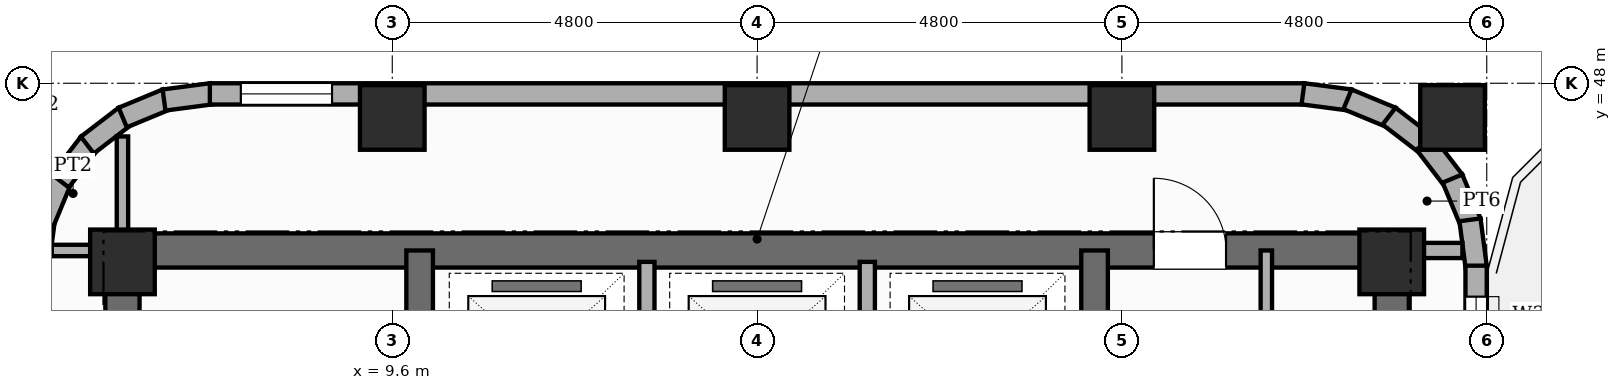
"""IFC4 building model, lengths in metres.
Left out: names, types, materials, properties, quantities, classifications, styles, units other than length and angle.
Written with IfcOpenShell. Run it as: python <this file> out.ifc"""

import sys

from ifc_helpers import new_model, si_unit, direction, frame, frame_2d, origin, origin_2d, place, context, subcontext, project, spatial, rectangle, extrude, element, fill, save


model = new_model("IFC4")
c1 = context("Model", 3, precision=1e-05, world=origin(), true_north=direction((0.0, 1.0)))
c2 = subcontext(c1, "Body", "Model", "MODEL_VIEW")
j1 = project(units=[si_unit("LENGTHUNIT", "METRE"), si_unit("PLANEANGLEUNIT", "RADIAN")], contexts=[c1])
p1 = place(None, origin())
s1 = spatial("IfcSite", under=j1, at=p1, CompositionType="ELEMENT")
p2 = place(p1, origin())
s2 = spatial("IfcBuilding", under=s1, at=p2, CompositionType="ELEMENT")
p3 = place(p2, frame((0.0, 0.0, 239.8)))
s3 = spatial("IfcBuildingStorey", under=s2, at=p3, CompositionType="ELEMENT", Elevation=239.8)
p4 = place(p3, frame((6.05, 30.675, 0.0), z_axis=(0.0, 0.0, 1.0), x_axis=(0.0, 1.0, 0.0)))
e1 = element("IfcWall", 1, at=p4, inside=s3, PredefinedType="SHEAR", context=c2, shape_type="SweptSolid", body=[
    extrude(rectangle(XDim=15.35, YDim=0.45, at=frame_2d((7.675, 0.0))), origin(), (0.0, 0.0, 1.0), 4.3),
])
p5 = place(p4, frame((10.675, 0.0, 0.0)))
e2 = element("IfcOpeningElement", 2, at=p5, cuts=e1, PredefinedType="OPENING", context=c2, shape_type="SweptSolid", body=[
    extrude(rectangle(XDim=0.95, YDim=2.15, at=frame_2d((0.475, 1.075))), frame((0.0, 0.235, 0.0), z_axis=(0.0, -1.0, 0.0), x_axis=(1.0, 0.0, 0.0)), (0.0, 0.0, 1.0), 0.47),
])
p6 = place(p3, frame((22.75, 30.675, 0.0), z_axis=(0.0, 0.0, 1.0), x_axis=(0.0, 1.0, 0.0)))
e3 = element("IfcWall", 3, at=p6, inside=s3, PredefinedType="SHEAR", context=c2, shape_type="SweptSolid", body=[
    extrude(rectangle(XDim=15.35, YDim=0.45, at=frame_2d((7.675, 0.0))), origin(), (0.0, 0.0, 1.0), 4.3),
])
p7 = place(p3, frame((6.05, 45.8, 0.0), z_axis=(0.0, 0.0, 1.0), x_axis=(1.0, 0.0, 0.0)))
e4 = element("IfcWall", 4, at=p7, inside=s3, PredefinedType="SHEAR", context=c2, shape_type="SweptSolid", body=[
    extrude(rectangle(XDim=16.7, YDim=0.45, at=frame_2d((8.35, 0.0))), origin(), (0.0, 0.0, 1.0), 4.3),
])
p8 = place(p7, frame((13.57, 0.0, 0.0)))
e5 = element("IfcOpeningElement", 5, at=p8, cuts=e4, PredefinedType="OPENING", context=c2, shape_type="SweptSolid", body=[
    extrude(rectangle(XDim=0.95, YDim=2.15, at=frame_2d((0.475, 1.075))), frame((0.0, 0.235, 0.0), z_axis=(0.0, -1.0, 0.0), x_axis=(1.0, 0.0, 0.0)), (0.0, 0.0, 1.0), 0.47),
])
p9 = place(p3, frame((9.96, 30.9, 0.0), z_axis=(0.0, 0.0, 1.0), x_axis=(0.0, 1.0, 0.0)))
e6 = element("IfcWall", 6, at=p9, inside=s3, PredefinedType="SHEAR", context=c2, shape_type="SweptSolid", body=[
    extrude(rectangle(XDim=14.9, YDim=0.35, at=frame_2d((7.45, 0.0))), origin(), (0.0, 0.0, 1.0), 4.3),
])
p10 = place(p9, frame((0.65, 0.0, 0.0)))
e7 = element("IfcOpeningElement", 7, at=p10, cuts=e6, PredefinedType="OPENING", context=c2, shape_type="SweptSolid", body=[
    extrude(rectangle(XDim=0.95, YDim=2.1, at=frame_2d((0.475, 1.05))), frame((0.0, 0.185, 0.0), z_axis=(0.0, -1.0, 0.0), x_axis=(1.0, 0.0, 0.0)), (0.0, 0.0, 1.0), 0.37),
])
p11 = place(p9, frame((10.45, 0.0, 0.0)))
e8 = element("IfcOpeningElement", 8, at=p11, cuts=e6, PredefinedType="OPENING", context=c2, shape_type="SweptSolid", body=[
    extrude(rectangle(XDim=1.0, YDim=2.15, at=frame_2d((0.5, 1.075))), frame((0.0, 0.185, 0.0), z_axis=(0.0, -1.0, 0.0), x_axis=(1.0, 0.0, 0.0)), (0.0, 0.0, 1.0), 0.37),
])
p12 = place(p3, frame((18.84, 30.9, 0.0), z_axis=(0.0, 0.0, 1.0), x_axis=(0.0, 1.0, 0.0)))
e9 = element("IfcWall", 9, at=p12, inside=s3, PredefinedType="SHEAR", context=c2, shape_type="SweptSolid", body=[
    extrude(rectangle(XDim=14.9, YDim=0.35, at=frame_2d((7.45, 0.0))), origin(), (0.0, 0.0, 1.0), 4.3),
])
p13 = place(p12, frame((0.65, 0.0, 0.0)))
e10 = element("IfcOpeningElement", 10, at=p13, cuts=e9, PredefinedType="OPENING", context=c2, shape_type="SweptSolid", body=[
    extrude(rectangle(XDim=0.95, YDim=2.1, at=frame_2d((0.475, 1.05))), frame((0.0, 0.185, 0.0), z_axis=(0.0, -1.0, 0.0), x_axis=(1.0, 0.0, 0.0)), (0.0, 0.0, 1.0), 0.37),
])
p14 = place(p12, frame((10.45, 0.0, 0.0)))
e11 = element("IfcOpeningElement", 11, at=p14, cuts=e9, PredefinedType="OPENING", context=c2, shape_type="SweptSolid", body=[
    extrude(rectangle(XDim=1.0, YDim=2.15, at=frame_2d((0.5, 1.075))), frame((0.0, 0.185, 0.0), z_axis=(0.0, -1.0, 0.0), x_axis=(1.0, 0.0, 0.0)), (0.0, 0.0, 1.0), 0.37),
])
for number, where, z_axis, x_axis in (
    (12, (6.05, 45.65, 0.0), (0.0, 0.0, 1.0), (1.0, 0.0, 0.0)),
    (13, (9.6, 47.55, 0.0), (0.0, 0.0, 1.0), (1.0, 0.0, 0.0)),
    (14, (14.4, 47.55, 0.0), (0.0, 0.0, 1.0), (1.0, 0.0, 0.0)),
    (15, (19.2, 47.55, 0.0), (0.0, 0.0, 1.0), (1.0, 0.0, 0.0)),
    (16, (22.75, 45.65, 0.0), (0.0, 0.0, 1.0), (1.0, 0.0, 0.0)),
    (17, (23.55, 47.55, 0.0), (0.0, 0.0, 1.0), (1.0, 0.0, 0.0)),
):
    element("IfcColumn", number, at=place(p3, frame(where, z_axis=z_axis, x_axis=x_axis)), inside=s3, PredefinedType="COLUMN", context=c2, shape_type="SweptSolid", body=[
        extrude(rectangle(XDim=0.85, YDim=0.85, at=origin_2d()), origin(), (0.0, 0.0, 1.0), 4.3),
    ])
for number, where, z_axis, x_axis in (
    (18, (4.939, 45.582, 0.0), (0.0, 0.0, 1.0), (0.131, 0.991, 0.0)),
    (19, (5.011, 46.167, 0.0), (0.0, 0.0, 1.0), (0.383, 0.924, 0.0)),
    (20, (5.233, 46.715, 0.0), (0.0, 0.0, 1.0), (0.609, 0.793, 0.0)),
    (21, (5.588, 47.186, 0.0), (0.0, 0.0, 1.0), (0.793, 0.609, 0.0)),
):
    element("IfcWall", number, at=place(p3, frame(where, z_axis=z_axis, x_axis=x_axis)), inside=s3, PredefinedType="STANDARD", context=c2, shape_type="SweptSolid", body=[
        extrude(rectangle(XDim=0.626, YDim=0.28, at=frame_2d((0.313, 0.0))), origin(), (0.0, 0.0, 1.0), 4.04),
    ])
p15 = place(p3, frame((6.054, 47.549, 0.0), z_axis=(0.0, 0.0, 1.0), x_axis=(0.923974080304, 0.382455093999, 0.0)))
e22 = element("IfcWall", 22, at=p15, inside=s3, PredefinedType="STANDARD", context=c2, shape_type="SweptSolid", body=[
    extrude(rectangle(XDim=0.626, YDim=0.28, at=frame_2d((0.313, 0.0))), origin(), (0.0, 0.0, 1.0), 4.04),
])
p16 = place(p3, frame((6.597, 47.779, 0.0), z_axis=(0.0, 0.0, 1.0), x_axis=(0.9914410257, 0.130555323746, 0.0)))
e23 = element("IfcWall", 23, at=p16, inside=s3, PredefinedType="STANDARD", context=c2, shape_type="SweptSolid", body=[
    extrude(rectangle(XDim=0.626, YDim=0.28, at=frame_2d((0.313, 0.0))), origin(), (0.0, 0.0, 1.0), 4.04),
])
p17 = place(p3, frame((7.2, 47.86, 0.0), z_axis=(0.0, 0.0, 1.0), x_axis=(1.0, 0.0, 0.0)))
e24 = element("IfcWall", 24, at=p17, inside=s3, PredefinedType="STANDARD", context=c2, shape_type="SweptSolid", body=[
    extrude(rectangle(XDim=14.4, YDim=0.28, at=frame_2d((7.2, 0.0))), origin(), (0.0, 0.0, 1.0), 3.32),
])
p18 = place(p17, frame((0.407, 0.0, 0.8)))
e25 = element("IfcOpeningElement", 25, at=p18, cuts=e24, PredefinedType="OPENING", context=c2, shape_type="SweptSolid", body=[
    extrude(rectangle(XDim=1.2, YDim=1.8, at=frame_2d((0.6, 0.9))), frame((0.0, 0.15, 0.0), z_axis=(0.0, -1.0, 0.0), x_axis=(1.0, 0.0, 0.0)), (0.0, 0.0, 1.0), 0.3),
])
for number, where, z_axis, x_axis in (
    (26, (21.582, 47.861, 0.0), (0.0, 0.0, 1.0), (0.991, -0.131, 0.0)),
    (27, (22.167, 47.789, 0.0), (0.0, 0.0, 1.0), (0.924, -0.382, 0.0)),
    (28, (22.715, 47.567, 0.0), (0.0, 0.0, 1.0), (0.793, -0.609, 0.0)),
    (29, (23.186, 47.212, 0.0), (0.0, 0.0, 1.0), (0.609, -0.793, 0.0)),
    (30, (23.549, 46.746, 0.0), (0.0, 0.0, 1.0), (0.382, -0.924, 0.0)),
    (31, (23.779, 46.203, 0.0), (0.0, 0.0, 1.0), (0.131, -0.991, 0.0)),
):
    element("IfcWall", number, at=place(p3, frame(where, z_axis=z_axis, x_axis=x_axis)), inside=s3, PredefinedType="STANDARD", context=c2, shape_type="SweptSolid", body=[
        extrude(rectangle(XDim=0.626, YDim=0.28, at=frame_2d((0.313, 0.0))), origin(), (0.0, 0.0, 1.0), 3.32),
    ])
p19 = place(p3, frame((23.86, 45.6, 0.0), z_axis=(0.0, 0.0, 1.0), x_axis=(0.0, -1.0, 0.0)))
e32 = element("IfcWall", 32, at=p19, inside=s3, PredefinedType="STANDARD", context=c2, shape_type="SweptSolid", body=[
    extrude(rectangle(XDim=33.6, YDim=0.28, at=frame_2d((16.8, 0.0))), origin(), (0.0, 0.0, 1.0), 3.32),
])
p20 = place(p19, frame((3.5, 0.0, 0.0)))
e33 = element("IfcOpeningElement", 33, at=p20, cuts=e32, PredefinedType="OPENING", context=c2, shape_type="SweptSolid", body=[
    extrude(rectangle(XDim=1.3, YDim=2.2, at=frame_2d((0.65, 1.1))), frame((0.0, 0.15, 0.0), z_axis=(0.0, -1.0, 0.0), x_axis=(1.0, 0.0, 0.0)), (0.0, 0.0, 1.0), 0.3),
])
p21 = place(p19, frame((23.45, 0.0, 0.0)))
e34 = element("IfcOpeningElement", 34, at=p21, cuts=e32, PredefinedType="OPENING", context=c2, shape_type="SweptSolid", body=[
    extrude(rectangle(XDim=1.1, YDim=2.15, at=frame_2d((0.55, 1.075))), frame((0.0, 0.15, 0.0), z_axis=(0.0, -1.0, 0.0), x_axis=(1.0, 0.0, 0.0)), (0.0, 0.0, 1.0), 0.3),
])
p22 = place(p19, frame((22.505, 0.0, 0.45)))
e35 = element("IfcOpeningElement", 35, at=p22, cuts=e32, PredefinedType="OPENING", context=c2, shape_type="SweptSolid", body=[
    extrude(rectangle(XDim=0.6, YDim=1.8, at=frame_2d((0.3, 0.9))), frame((0.0, 0.15, 0.0), z_axis=(0.0, -1.0, 0.0), x_axis=(1.0, 0.0, 0.0)), (0.0, 0.0, 1.0), 0.3),
])
p23 = place(p19, frame((0.407, 0.0, 0.8)))
e36 = element("IfcOpeningElement", 36, at=p23, cuts=e32, PredefinedType="OPENING", context=c2, shape_type="SweptSolid", body=[
    extrude(rectangle(XDim=1.2, YDim=1.8, at=frame_2d((0.6, 0.9))), frame((0.0, 0.15, 0.0), z_axis=(0.0, -1.0, 0.0), x_axis=(1.0, 0.0, 0.0)), (0.0, 0.0, 1.0), 0.3),
])
p24 = place(p19, frame((29.477, 0.0, 0.8)))
e37 = element("IfcOpeningElement", 37, at=p24, cuts=e32, PredefinedType="OPENING", context=c2, shape_type="SweptSolid", body=[
    extrude(rectangle(XDim=0.95, YDim=1.8, at=frame_2d((0.475, 0.9))), frame((0.0, 0.15, 0.0), z_axis=(0.0, -1.0, 0.0), x_axis=(1.0, 0.0, 0.0)), (0.0, 0.0, 1.0), 0.3),
])
p25 = place(p19, frame((20.133, 0.0, 0.45)))
e38 = element("IfcOpeningElement", 38, at=p25, cuts=e32, PredefinedType="OPENING", context=c2, shape_type="SweptSolid", body=[
    extrude(rectangle(XDim=0.75, YDim=1.8, at=frame_2d((0.375, 0.9))), frame((0.0, 0.15, 0.0), z_axis=(0.0, -1.0, 0.0), x_axis=(1.0, 0.0, 0.0)), (0.0, 0.0, 1.0), 0.3),
])
p26 = place(p3, frame((21.1, 40.03, 0.0), z_axis=(0.0, 0.0, 1.0), x_axis=(0.0, 1.0, 0.0)))
e39 = element("IfcWall", 39, at=p26, inside=s3, PredefinedType="PARTITIONING", context=c2, shape_type="SweptSolid", body=[
    extrude(rectangle(XDim=5.77, YDim=0.15, at=frame_2d((2.885, 0.0))), origin(), (0.0, 0.0, 1.0), 4.04),
])
p27 = place(p26, frame((1.2, 0.0, 0.0)))
e40 = element("IfcOpeningElement", 40, at=p27, cuts=e39, PredefinedType="OPENING", context=c2, shape_type="SweptSolid", body=[
    extrude(rectangle(XDim=0.95, YDim=2.15, at=frame_2d((0.475, 1.075))), frame((0.0, 0.085, 0.0), z_axis=(0.0, -1.0, 0.0), x_axis=(1.0, 0.0, 0.0)), (0.0, 0.0, 1.0), 0.17),
])
p28 = place(p3, frame((22.75, 45.8, 0.0), z_axis=(0.0, 0.0, 1.0), x_axis=(1.0, 0.0, 0.0)))
e41 = element("IfcWall", 41, at=p28, inside=s3, PredefinedType="POLYGONAL", context=c2, shape_type="SweptSolid", body=[
    extrude(rectangle(XDim=0.93, YDim=0.2, at=frame_2d((0.465, 0.0))), origin(), (0.0, 0.0, 1.0), 4.04),
])
for number, where, z_axis, x_axis in (
    (42, (12.95, 43.1, 0.0), (0.0, 0.0, 1.0), (0.0, 1.0, 0.0)),
    (43, (15.85, 43.1, 0.0), (0.0, 0.0, 1.0), (0.0, 1.0, 0.0)),
):
    element("IfcWall", number, at=place(p3, frame(where, z_axis=z_axis, x_axis=x_axis)), inside=s3, PredefinedType="POLYGONAL", context=c2, shape_type="SweptSolid", body=[
        extrude(rectangle(XDim=2.55, YDim=0.2, at=frame_2d((1.275, 0.0))), origin(), (0.0, 0.0, 1.0), 4.04),
    ])
p29 = place(p3, frame((5.12, 45.8, 0.0), z_axis=(0.0, 0.0, 1.0), x_axis=(1.0, 0.0, 0.0)))
e44 = element("IfcWall", 44, at=p29, inside=s3, PredefinedType="PARTITIONING", context=c2, shape_type="SweptSolid", body=[
    extrude(rectangle(XDim=0.93, YDim=0.15, at=frame_2d((0.465, 0.0))), origin(), (0.0, 0.0, 1.0), 4.04),
])
p30 = place(p3, frame((6.05, 45.8, 0.0), z_axis=(0.0, 0.0, 1.0), x_axis=(0.0, 1.0, 0.0)))
e45 = element("IfcWall", 45, at=p30, inside=s3, PredefinedType="PARTITIONING", context=c2, shape_type="SweptSolid", body=[
    extrude(rectangle(XDim=1.5, YDim=0.15, at=frame_2d((0.75, 0.0))), origin(), (0.0, 0.0, 1.0), 4.04),
])
p31 = place(p18, origin())
e46 = element("IfcWindow", 46, at=p31, inside=s3, PartitioningType="SINGLE_PANEL", PredefinedType="WINDOW", context=c2, shape_type="SweptSolid", body=[
    extrude(rectangle(XDim=1.2, YDim=1.8, at=frame_2d((0.6, 0.9))), frame((0.0, 0.03, 0.0), z_axis=(0.0, -1.0, 0.0), x_axis=(1.0, 0.0, 0.0)), (0.0, 0.0, 1.0), 0.06),
])
fill(e25, e46)
p32 = place(p23, origin())
e47 = element("IfcWindow", 47, at=p32, inside=s3, PartitioningType="SINGLE_PANEL", PredefinedType="WINDOW", context=c2, shape_type="SweptSolid", body=[
    extrude(rectangle(XDim=1.2, YDim=1.8, at=frame_2d((0.6, 0.9))), frame((0.0, 0.03, 0.0), z_axis=(0.0, -1.0, 0.0), x_axis=(1.0, 0.0, 0.0)), (0.0, 0.0, 1.0), 0.06),
])
fill(e36, e47)
p33 = place(p8, origin())
e48 = element("IfcDoor", 48, at=p33, inside=s3, OperationType="SINGLE_SWING_LEFT", PredefinedType="DOOR", context=c2, shape_type="SweptSolid", body=[
    extrude(rectangle(XDim=0.95, YDim=2.15, at=frame_2d((0.475, 1.075))), frame((0.0, 0.025, 0.0), z_axis=(0.0, -1.0, 0.0), x_axis=(1.0, 0.0, 0.0)), (0.0, 0.0, 1.0), 0.05),
])
fill(e5, e48)
save(model, sys.argv[1])
